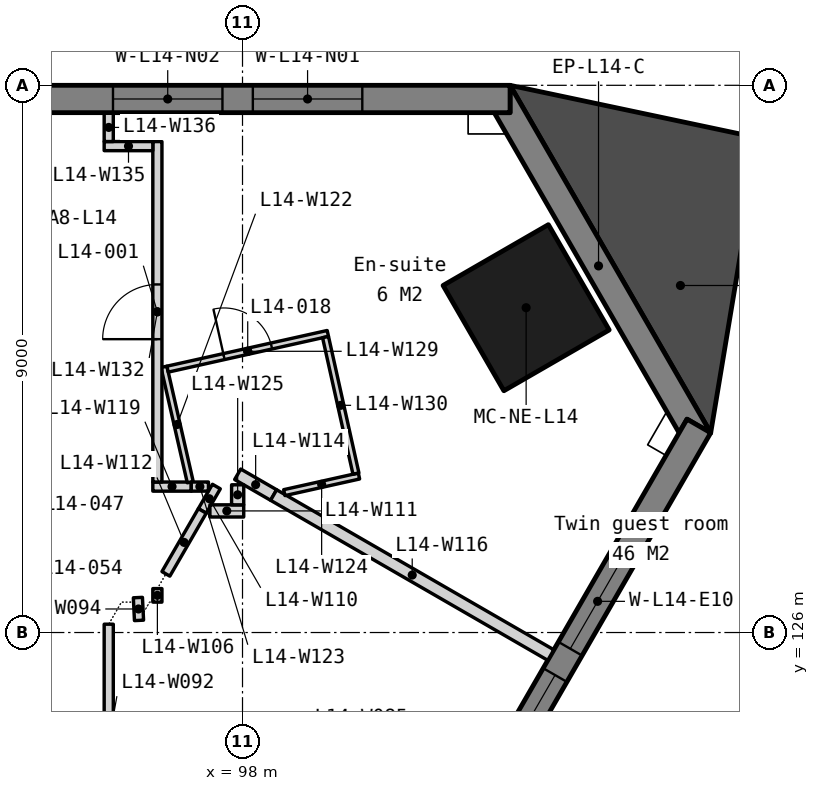
"""IFC4 building model, lengths in metres.
Left out: names, types, materials, properties, quantities, classifications, styles, units other than length and angle.
Written with IfcOpenShell. Run it as: python <this file> out.ifc"""

import sys

from ifc_helpers import new_model, si_unit, direction, frame, frame_2d, origin, origin_2d, place, context, subcontext, project, spatial, polyline, rectangle, outline, extrude, element, fill, save


model = new_model("IFC4")
c1 = context("Model", 3, precision=1e-05, world=origin(), true_north=direction((0.0, 1.0)))
c2 = subcontext(c1, "Body", "Model", "MODEL_VIEW")
j1 = project(units=[si_unit("LENGTHUNIT", "METRE"), si_unit("PLANEANGLEUNIT", "RADIAN")], contexts=[c1])
p1 = place(None, origin())
s1 = spatial("IfcSite", under=j1, at=p1, CompositionType="ELEMENT")
p2 = place(p1, origin())
s2 = spatial("IfcBuilding", under=s1, at=p2, CompositionType="ELEMENT")
p3 = place(p2, frame((0.0, 0.0, 63.0)))
s3 = spatial("IfcBuildingStorey", under=s2, at=p3, CompositionType="ELEMENT", Elevation=63.0)
p4 = place(p3, frame((102.664, 131.342, 0.0), z_axis=(0.0, 0.0, 1.0), x_axis=(-0.5, 0.866025403784, 0.0)))
e1 = element("IfcColumn", 1, at=p4, inside=s3, PredefinedType="COLUMN", context=c2, shape_type="SweptSolid", body=[
    extrude(rectangle(XDim=2.0, YDim=2.0, at=origin_2d()), origin(), (0.0, 0.0, 1.0), 3.5),
])
p5 = place(p3, frame((0.0, 0.0, -0.15)))
e2 = element("IfcWall", 2, at=p5, inside=s3, PredefinedType="SOLIDWALL", context=c2, shape_type="SweptSolid", body=[
    extrude(outline(polyline([(105.7, 129.284), (105.31, 129.509), (105.18, 129.284), (102.14, 134.55), (102.4, 134.55), (102.4, 135.0), (105.7, 129.284)])), origin(), (0.0, 0.0, 1.0), 3.5),
])
p6 = place(p3, frame((102.4, 134.775, -0.15), z_axis=(0.0, 0.0, 1.0), x_axis=(-1.0, 0.0, 0.0)))
e3 = element("IfcWall", 3, at=p6, inside=s3, PredefinedType="SOLIDWALL", context=c2, shape_type="SweptSolid", body=[
    extrude(outline(polyline([(44.8, 0.0), (44.8, 3.5), (0.0, 3.5), (0.0, 0.0), (44.8, 0.0)])), frame((0.0, 0.225, 0.0), z_axis=(0.0, -1.0, 0.0), x_axis=(1.0, 0.0, 0.0)), (0.0, 0.0, 1.0), 0.45),
])
p7 = place(p6, frame((2.43, 0.0, 1.05)))
e4 = element("IfcOpeningElement", 4, at=p7, cuts=e3, PredefinedType="OPENING", context=c2, shape_type="SweptSolid", body=[
    extrude(rectangle(XDim=1.8, YDim=1.5, at=frame_2d((0.9, 0.75))), frame((0.0, 0.235, 0.0), z_axis=(0.0, -1.0, 0.0), x_axis=(1.0, 0.0, 0.0)), (0.0, 0.0, 1.0), 0.47),
])
p8 = place(p6, frame((4.73, 0.0, 1.05)))
e5 = element("IfcOpeningElement", 5, at=p8, cuts=e3, PredefinedType="OPENING", context=c2, shape_type="SweptSolid", body=[
    extrude(rectangle(XDim=1.8, YDim=1.5, at=frame_2d((0.9, 0.75))), frame((0.0, 0.235, 0.0), z_axis=(0.0, -1.0, 0.0), x_axis=(1.0, 0.0, 0.0)), (0.0, 0.0, 1.0), 0.47),
])
p9 = place(p6, frame((11.39, 0.0, 1.05)))
e6 = element("IfcOpeningElement", 6, at=p9, cuts=e3, PredefinedType="OPENING", context=c2, shape_type="SweptSolid", body=[
    extrude(rectangle(XDim=1.8, YDim=1.5, at=frame_2d((0.9, 0.75))), frame((0.0, 0.235, 0.0), z_axis=(0.0, -1.0, 0.0), x_axis=(1.0, 0.0, 0.0)), (0.0, 0.0, 1.0), 0.47),
])
p10 = place(p6, frame((13.69, 0.0, 1.05)))
e7 = element("IfcOpeningElement", 7, at=p10, cuts=e3, PredefinedType="OPENING", context=c2, shape_type="SweptSolid", body=[
    extrude(rectangle(XDim=1.8, YDim=1.5, at=frame_2d((0.9, 0.75))), frame((0.0, 0.235, 0.0), z_axis=(0.0, -1.0, 0.0), x_axis=(1.0, 0.0, 0.0)), (0.0, 0.0, 1.0), 0.47),
])
p11 = place(p6, frame((20.35, 0.0, 1.05)))
e8 = element("IfcOpeningElement", 8, at=p11, cuts=e3, PredefinedType="OPENING", context=c2, shape_type="SweptSolid", body=[
    extrude(rectangle(XDim=1.8, YDim=1.5, at=frame_2d((0.9, 0.75))), frame((0.0, 0.235, 0.0), z_axis=(0.0, -1.0, 0.0), x_axis=(1.0, 0.0, 0.0)), (0.0, 0.0, 1.0), 0.47),
])
p12 = place(p6, frame((22.65, 0.0, 1.05)))
e9 = element("IfcOpeningElement", 9, at=p12, cuts=e3, PredefinedType="OPENING", context=c2, shape_type="SweptSolid", body=[
    extrude(rectangle(XDim=1.8, YDim=1.5, at=frame_2d((0.9, 0.75))), frame((0.0, 0.235, 0.0), z_axis=(0.0, -1.0, 0.0), x_axis=(1.0, 0.0, 0.0)), (0.0, 0.0, 1.0), 0.47),
])
p13 = place(p6, frame((29.31, 0.0, 1.05)))
e10 = element("IfcOpeningElement", 10, at=p13, cuts=e3, PredefinedType="OPENING", context=c2, shape_type="SweptSolid", body=[
    extrude(rectangle(XDim=1.8, YDim=1.5, at=frame_2d((0.9, 0.75))), frame((0.0, 0.235, 0.0), z_axis=(0.0, -1.0, 0.0), x_axis=(1.0, 0.0, 0.0)), (0.0, 0.0, 1.0), 0.47),
])
p14 = place(p6, frame((31.61, 0.0, 1.05)))
e11 = element("IfcOpeningElement", 11, at=p14, cuts=e3, PredefinedType="OPENING", context=c2, shape_type="SweptSolid", body=[
    extrude(rectangle(XDim=1.8, YDim=1.5, at=frame_2d((0.9, 0.75))), frame((0.0, 0.235, 0.0), z_axis=(0.0, -1.0, 0.0), x_axis=(1.0, 0.0, 0.0)), (0.0, 0.0, 1.0), 0.47),
])
p15 = place(p6, frame((38.27, 0.0, 1.05)))
e12 = element("IfcOpeningElement", 12, at=p15, cuts=e3, PredefinedType="OPENING", context=c2, shape_type="SweptSolid", body=[
    extrude(rectangle(XDim=1.8, YDim=1.5, at=frame_2d((0.9, 0.75))), frame((0.0, 0.235, 0.0), z_axis=(0.0, -1.0, 0.0), x_axis=(1.0, 0.0, 0.0)), (0.0, 0.0, 1.0), 0.47),
])
p16 = place(p6, frame((40.57, 0.0, 1.05)))
e13 = element("IfcOpeningElement", 13, at=p16, cuts=e3, PredefinedType="OPENING", context=c2, shape_type="SweptSolid", body=[
    extrude(rectangle(XDim=1.8, YDim=1.5, at=frame_2d((0.9, 0.75))), frame((0.0, 0.235, 0.0), z_axis=(0.0, -1.0, 0.0), x_axis=(1.0, 0.0, 0.0)), (0.0, 0.0, 1.0), 0.47),
])
p17 = place(p3, frame((83.105, 90.599, -0.15), z_axis=(0.0, 0.0, 1.0), x_axis=(0.499999201451, 0.866025864826, 0.0)))
e14 = element("IfcWall", 14, at=p17, inside=s3, PredefinedType="SOLIDWALL", context=c2, shape_type="SweptSolid", body=[
    extrude(outline(polyline([(44.8, 0.0), (44.8, 3.5), (0.0, 3.5), (0.0, 0.0), (44.8, 0.0)])), frame((0.0, 0.225, 0.0), z_axis=(0.0, -1.0, 0.0), x_axis=(1.0, 0.0, 0.0)), (0.0, 0.0, 1.0), 0.45),
])
p18 = place(p17, frame((2.43, 0.0, 1.05)))
e15 = element("IfcOpeningElement", 15, at=p18, cuts=e14, PredefinedType="OPENING", context=c2, shape_type="SweptSolid", body=[
    extrude(rectangle(XDim=1.8, YDim=1.5, at=frame_2d((0.9, 0.75))), frame((0.0, 0.235, 0.0), z_axis=(0.0, -1.0, 0.0), x_axis=(1.0, 0.0, 0.0)), (0.0, 0.0, 1.0), 0.47),
])
p19 = place(p17, frame((4.73, 0.0, 1.05)))
e16 = element("IfcOpeningElement", 16, at=p19, cuts=e14, PredefinedType="OPENING", context=c2, shape_type="SweptSolid", body=[
    extrude(rectangle(XDim=1.8, YDim=1.5, at=frame_2d((0.9, 0.75))), frame((0.0, 0.235, 0.0), z_axis=(0.0, -1.0, 0.0), x_axis=(1.0, 0.0, 0.0)), (0.0, 0.0, 1.0), 0.47),
])
p20 = place(p17, frame((11.39, 0.0, 1.05)))
e17 = element("IfcOpeningElement", 17, at=p20, cuts=e14, PredefinedType="OPENING", context=c2, shape_type="SweptSolid", body=[
    extrude(rectangle(XDim=1.8, YDim=1.5, at=frame_2d((0.9, 0.75))), frame((0.0, 0.235, 0.0), z_axis=(0.0, -1.0, 0.0), x_axis=(1.0, 0.0, 0.0)), (0.0, 0.0, 1.0), 0.47),
])
p21 = place(p17, frame((13.69, 0.0, 1.05)))
e18 = element("IfcOpeningElement", 18, at=p21, cuts=e14, PredefinedType="OPENING", context=c2, shape_type="SweptSolid", body=[
    extrude(rectangle(XDim=1.8, YDim=1.5, at=frame_2d((0.9, 0.75))), frame((0.0, 0.235, 0.0), z_axis=(0.0, -1.0, 0.0), x_axis=(1.0, 0.0, 0.0)), (0.0, 0.0, 1.0), 0.47),
])
p22 = place(p17, frame((20.35, 0.0, 1.05)))
e19 = element("IfcOpeningElement", 19, at=p22, cuts=e14, PredefinedType="OPENING", context=c2, shape_type="SweptSolid", body=[
    extrude(rectangle(XDim=1.8, YDim=1.5, at=frame_2d((0.9, 0.75))), frame((0.0, 0.235, 0.0), z_axis=(0.0, -1.0, 0.0), x_axis=(1.0, 0.0, 0.0)), (0.0, 0.0, 1.0), 0.47),
])
p23 = place(p17, frame((22.65, 0.0, 1.05)))
e20 = element("IfcOpeningElement", 20, at=p23, cuts=e14, PredefinedType="OPENING", context=c2, shape_type="SweptSolid", body=[
    extrude(rectangle(XDim=1.8, YDim=1.5, at=frame_2d((0.9, 0.75))), frame((0.0, 0.235, 0.0), z_axis=(0.0, -1.0, 0.0), x_axis=(1.0, 0.0, 0.0)), (0.0, 0.0, 1.0), 0.47),
])
p24 = place(p17, frame((29.31, 0.0, 1.05)))
e21 = element("IfcOpeningElement", 21, at=p24, cuts=e14, PredefinedType="OPENING", context=c2, shape_type="SweptSolid", body=[
    extrude(rectangle(XDim=1.8, YDim=1.5, at=frame_2d((0.9, 0.75))), frame((0.0, 0.235, 0.0), z_axis=(0.0, -1.0, 0.0), x_axis=(1.0, 0.0, 0.0)), (0.0, 0.0, 1.0), 0.47),
])
p25 = place(p17, frame((31.61, 0.0, 1.05)))
e22 = element("IfcOpeningElement", 22, at=p25, cuts=e14, PredefinedType="OPENING", context=c2, shape_type="SweptSolid", body=[
    extrude(rectangle(XDim=1.8, YDim=1.5, at=frame_2d((0.9, 0.75))), frame((0.0, 0.235, 0.0), z_axis=(0.0, -1.0, 0.0), x_axis=(1.0, 0.0, 0.0)), (0.0, 0.0, 1.0), 0.47),
])
p26 = place(p17, frame((38.27, 0.0, 1.05)))
e23 = element("IfcOpeningElement", 23, at=p26, cuts=e14, PredefinedType="OPENING", context=c2, shape_type="SweptSolid", body=[
    extrude(rectangle(XDim=1.8, YDim=1.5, at=frame_2d((0.9, 0.75))), frame((0.0, 0.235, 0.0), z_axis=(0.0, -1.0, 0.0), x_axis=(1.0, 0.0, 0.0)), (0.0, 0.0, 1.0), 0.47),
])
p27 = place(p17, frame((40.57, 0.0, 1.05)))
e24 = element("IfcOpeningElement", 24, at=p27, cuts=e14, PredefinedType="OPENING", context=c2, shape_type="SweptSolid", body=[
    extrude(rectangle(XDim=1.8, YDim=1.5, at=frame_2d((0.9, 0.75))), frame((0.0, 0.235, 0.0), z_axis=(0.0, -1.0, 0.0), x_axis=(1.0, 0.0, 0.0)), (0.0, 0.0, 1.0), 0.47),
])
p28 = place(p3, frame((0.0, 0.0, -0.15)))
e25 = element("IfcWall", 25, at=p28, inside=s3, PredefinedType="SOLIDWALL", context=c2, shape_type="SweptSolid", body=[
    extrude(outline(polyline([(105.7, 129.284), (106.507, 134.131), (102.4, 135.0), (105.7, 129.284)])), origin(), (0.0, 0.0, 1.0), 3.5),
])
p29 = place(p3, frame((95.8, 122.252, 0.0), z_axis=(0.0, 0.0, 1.0), x_axis=(0.0, 1.0, 0.0)))
e26 = element("IfcWall", 26, at=p29, inside=s3, PredefinedType="PARTITIONING", context=c2, shape_type="SweptSolid", body=[
    extrude(rectangle(XDim=3.885, YDim=0.15, at=frame_2d((1.942, 0.0))), origin(), (0.0, 0.0, 1.0), 3.35),
])
p30 = place(p29, frame((1.492, 0.0, 0.0)))
e27 = element("IfcOpeningElement", 27, at=p30, cuts=e26, PredefinedType="OPENING", context=c2, shape_type="SweptSolid", body=[
    extrude(rectangle(XDim=0.9, YDim=2.1, at=frame_2d((0.45, 1.05))), frame((0.0, 0.085, 0.0), z_axis=(0.0, -1.0, 0.0), x_axis=(1.0, 0.0, 0.0)), (0.0, 0.0, 1.0), 0.17),
])
p31 = place(p3, frame((96.28, 126.575, 0.0), z_axis=(0.0, 0.0, 1.0), x_axis=(0.049354603538, -0.998781318963, 0.0)))
e28 = element("IfcWall", 28, at=p31, inside=s3, PredefinedType="PARTITIONING", context=c2, shape_type="SweptSolid", body=[
    extrude(rectangle(XDim=0.376, YDim=0.15, at=frame_2d((0.188, 0.0))), origin(), (0.0, 0.0, 1.0), 3.35),
])
p32 = place(p3, frame((96.6, 126.5, 0.0), z_axis=(0.0, 0.0, 1.0), x_axis=(0.0, 1.0, 0.0)))
e29 = element("IfcWall", 29, at=p32, inside=s3, PredefinedType="PARTITIONING", context=c2, shape_type="SweptSolid", body=[
    extrude(rectangle(XDim=0.223, YDim=0.15, at=frame_2d((0.111, 0.0))), origin(), (0.0, 0.0, 1.0), 3.35),
])
p33 = place(p3, frame((97.339, 128.0, 0.0), z_axis=(0.0, 0.0, 1.0), x_axis=(0.500391795928, 0.865799082101, 0.0)))
e30 = element("IfcWall", 30, at=p33, inside=s3, PredefinedType="PARTITIONING", context=c2, shape_type="SweptSolid", body=[
    extrude(rectangle(XDim=0.463, YDim=0.15, at=frame_2d((0.231, 0.0))), origin(), (0.0, 0.0, 1.0), 3.35),
])
p34 = place(p3, frame((97.464, 128.0, 0.0), z_axis=(0.0, 0.0, 1.0), x_axis=(1.0, 0.0, 0.0)))
e31 = element("IfcWall", 31, at=p34, inside=s3, PredefinedType="PARTITIONING", context=c2, shape_type="SweptSolid", body=[
    extrude(rectangle(XDim=0.556, YDim=0.2, at=frame_2d((0.278, 0.0))), origin(), (0.0, 0.0, 1.0), 2.938),
])
p35 = place(p3, frame((96.74, 126.965, 0.0), z_axis=(0.0, 0.0, 1.0), x_axis=(0.500529245116, 0.865719628277, 0.0)))
e32 = element("IfcWall", 32, at=p35, inside=s3, PredefinedType="PARTITIONING", context=c2, shape_type="SweptSolid", body=[
    extrude(rectangle(XDim=1.196, YDim=0.15, at=frame_2d((0.598, 0.0))), origin(), (0.0, 0.0, 1.0), 3.35),
])
p36 = place(p3, frame((97.921, 128.603, 0.0), z_axis=(0.0, 0.0, 1.0), x_axis=(0.865989003036, -0.500063042646, 0.0)))
e33 = element("IfcWall", 33, at=p36, inside=s3, PredefinedType="PARTITIONING", context=c2, shape_type="SweptSolid", body=[
    extrude(rectangle(XDim=0.683, YDim=0.2, at=frame_2d((0.341, 0.0))), origin(), (0.0, 0.0, 1.0), 3.35),
])
p37 = place(p3, frame((98.512, 128.261, 0.0), z_axis=(0.0, 0.0, 1.0), x_axis=(0.866031112038, -0.499990112884, 0.0)))
e34 = element("IfcWall", 34, at=p37, inside=s3, PredefinedType="PARTITIONING", context=c2, shape_type="SweptSolid", body=[
    extrude(rectangle(XDim=5.264, YDim=0.2, at=frame_2d((2.632, 0.0))), origin(), (0.0, 0.0, 1.0), 3.35),
])
p38 = place(p3, frame((96.525, 128.4, 0.0), z_axis=(0.0, 0.0, 1.0), x_axis=(1.0, 0.0, 0.0)))
e35 = element("IfcWall", 35, at=p38, inside=s3, PredefinedType="PARTITIONING", context=c2, shape_type="SweptSolid", body=[
    extrude(rectangle(XDim=0.633, YDim=0.15, at=frame_2d((0.316, 0.0))), origin(), (0.0, 0.0, 1.0), 3.35),
])
p39 = place(p3, frame((96.708, 130.37, 0.0), z_axis=(0.0, 0.0, 1.0), x_axis=(0.222402197424, -0.974955005413, 0.0)))
e36 = element("IfcWall", 36, at=p39, inside=s3, PredefinedType="PARTITIONING", context=c2, shape_type="SweptSolid", body=[
    extrude(rectangle(XDim=1.945, YDim=0.1, at=frame_2d((0.973, 0.0))), origin(), (0.0, 0.0, 1.0), 3.35),
])
p40 = place(p3, frame((97.157, 128.4, 0.0), z_axis=(0.0, 0.0, 1.0), x_axis=(0.999996638419, 0.002592903989, 0.0)))
e37 = element("IfcWall", 37, at=p40, inside=s3, PredefinedType="PARTITIONING", context=c2, shape_type="SweptSolid", body=[
    extrude(rectangle(XDim=0.282, YDim=0.15, at=frame_2d((0.141, 0.0))), origin(), (0.0, 0.0, 1.0), 3.35),
])
p41 = place(p3, frame((98.687, 128.301, 0.0), z_axis=(0.0, 0.0, 1.0), x_axis=(0.976063649291, 0.217485062782, 0.0)))
e38 = element("IfcWall", 38, at=p41, inside=s3, PredefinedType="PARTITIONING", context=c2, shape_type="SweptSolid", body=[
    extrude(rectangle(XDim=1.258, YDim=0.1, at=frame_2d((0.629, 0.0))), origin(), (0.0, 0.0, 1.0), 3.35),
])
p42 = place(p3, frame((97.92, 128.1, 0.0), z_axis=(0.0, 0.0, 1.0), x_axis=(0.000740740538, 0.999999725652, 0.0)))
e39 = element("IfcWall", 39, at=p42, inside=s3, PredefinedType="PARTITIONING", context=c2, shape_type="SweptSolid", body=[
    extrude(rectangle(XDim=0.33, YDim=0.2, at=frame_2d((0.165, 0.0))), origin(), (0.0, 0.0, 1.0), 3.35),
])
p43 = place(p3, frame((96.768, 130.332, 0.0), z_axis=(0.0, 0.0, 1.0), x_axis=(0.976069905732, 0.21745698224, 0.0)))
e40 = element("IfcWall", 40, at=p43, inside=s3, PredefinedType="PARTITIONING", context=c2, shape_type="SweptSolid", body=[
    extrude(rectangle(XDim=2.7, YDim=0.1, at=frame_2d((1.35, 0.0))), origin(), (0.0, 0.0, 1.0), 3.35),
])
p44 = place(p43, frame((0.95, 0.0, 0.0)))
e41 = element("IfcOpeningElement", 41, at=p44, cuts=e40, PredefinedType="OPENING", context=c2, shape_type="SweptSolid", body=[
    extrude(rectangle(XDim=0.8, YDim=2.1, at=frame_2d((0.4, 1.05))), frame((0.0, 0.06, 0.0), z_axis=(0.0, -1.0, 0.0), x_axis=(1.0, 0.0, 0.0)), (0.0, 0.0, 1.0), 0.12),
])
p45 = place(p3, frame((99.365, 130.859, 0.0), z_axis=(0.0, 0.0, 1.0), x_axis=(0.217402503607, -0.97608204134, 0.0)))
e42 = element("IfcWall", 42, at=p45, inside=s3, PredefinedType="PARTITIONING", context=c2, shape_type="SweptSolid", body=[
    extrude(rectangle(XDim=2.3, YDim=0.1, at=frame_2d((1.15, 0.0))), origin(), (0.0, 0.0, 1.0), 3.35),
])
p46 = place(p3, frame((96.6, 128.475, 0.0), z_axis=(0.0, 0.0, 1.0), x_axis=(0.0, 1.0, 0.0)))
e43 = element("IfcWall", 43, at=p46, inside=s3, PredefinedType="PARTITIONING", context=c2, shape_type="SweptSolid", body=[
    extrude(rectangle(XDim=5.599, YDim=0.15, at=frame_2d((2.8, 0.0))), origin(), (0.0, 0.0, 1.0), 3.35),
])
p47 = place(p46, frame((2.35, 0.0, 0.0)))
e44 = element("IfcOpeningElement", 44, at=p47, cuts=e43, PredefinedType="OPENING", context=c2, shape_type="SweptSolid", body=[
    extrude(rectangle(XDim=0.9, YDim=2.1, at=frame_2d((0.45, 1.05))), frame((0.0, 0.085, 0.0), z_axis=(0.0, -1.0, 0.0), x_axis=(1.0, 0.0, 0.0)), (0.0, 0.0, 1.0), 0.17),
])
p48 = place(p3, frame((95.725, 134.0, 0.0), z_axis=(0.0, 0.0, 1.0), x_axis=(0.999999813645, -0.000610500497, 0.0)))
e45 = element("IfcWall", 45, at=p48, inside=s3, PredefinedType="PARTITIONING", context=c2, shape_type="SweptSolid", body=[
    extrude(rectangle(XDim=0.8, YDim=0.15, at=frame_2d((0.4, 0.0))), origin(), (0.0, 0.0, 1.0), 2.887),
])
p49 = place(p3, frame((95.8, 134.075, 0.0), z_axis=(0.0, 0.0, 1.0), x_axis=(0.0, 1.0, 0.0)))
e46 = element("IfcWall", 46, at=p49, inside=s3, PredefinedType="PARTITIONING", context=c2, shape_type="SweptSolid", body=[
    extrude(rectangle(XDim=0.465, YDim=0.15, at=frame_2d((0.232, 0.0))), origin(), (0.0, 0.0, 1.0), 3.35),
])
p50 = place(p7, origin())
e47 = element("IfcWindow", 47, at=p50, inside=s3, PartitioningType="SINGLE_PANEL", PredefinedType="WINDOW", context=c2, shape_type="SweptSolid", body=[
    extrude(rectangle(XDim=1.8, YDim=1.5, at=frame_2d((0.9, 0.75))), frame((0.0, 0.03, 0.0), z_axis=(0.0, -1.0, 0.0), x_axis=(1.0, 0.0, 0.0)), (0.0, 0.0, 1.0), 0.06),
])
fill(e4, e47)
p51 = place(p8, origin())
e48 = element("IfcWindow", 48, at=p51, inside=s3, PartitioningType="SINGLE_PANEL", PredefinedType="WINDOW", context=c2, shape_type="SweptSolid", body=[
    extrude(rectangle(XDim=1.8, YDim=1.5, at=frame_2d((0.9, 0.75))), frame((0.0, 0.03, 0.0), z_axis=(0.0, -1.0, 0.0), x_axis=(1.0, 0.0, 0.0)), (0.0, 0.0, 1.0), 0.06),
])
fill(e5, e48)
p52 = place(p26, origin())
e49 = element("IfcWindow", 49, at=p52, inside=s3, PartitioningType="SINGLE_PANEL", PredefinedType="WINDOW", context=c2, shape_type="SweptSolid", body=[
    extrude(rectangle(XDim=1.8, YDim=1.5, at=frame_2d((0.9, 0.75))), frame((0.0, 0.03, 0.0), z_axis=(0.0, -1.0, 0.0), x_axis=(1.0, 0.0, 0.0)), (0.0, 0.0, 1.0), 0.06),
])
fill(e23, e49)
p53 = place(p27, origin())
e50 = element("IfcWindow", 50, at=p53, inside=s3, PartitioningType="SINGLE_PANEL", PredefinedType="WINDOW", context=c2, shape_type="SweptSolid", body=[
    extrude(rectangle(XDim=1.8, YDim=1.5, at=frame_2d((0.9, 0.75))), frame((0.0, 0.03, 0.0), z_axis=(0.0, -1.0, 0.0), x_axis=(1.0, 0.0, 0.0)), (0.0, 0.0, 1.0), 0.06),
])
fill(e24, e50)
p54 = place(p47, origin())
e51 = element("IfcDoor", 51, at=p54, inside=s3, OperationType="SINGLE_SWING_LEFT", PredefinedType="DOOR", context=c2, shape_type="SweptSolid", body=[
    extrude(rectangle(XDim=0.9, YDim=2.1, at=frame_2d((0.45, 1.05))), frame((0.0, 0.025, 0.0), z_axis=(0.0, -1.0, 0.0), x_axis=(1.0, 0.0, 0.0)), (0.0, 0.0, 1.0), 0.05),
])
fill(e44, e51)
p55 = place(p44, origin())
e52 = element("IfcDoor", 52, at=p55, inside=s3, OperationType="SINGLE_SWING_LEFT", PredefinedType="DOOR", context=c2, shape_type="SweptSolid", body=[
    extrude(rectangle(XDim=0.8, YDim=2.1, at=frame_2d((0.4, 1.05))), frame((0.0, 0.025, 0.0), z_axis=(0.0, -1.0, 0.0), x_axis=(1.0, 0.0, 0.0)), (0.0, 0.0, 1.0), 0.05),
])
fill(e41, e52)
save(model, sys.argv[1])
